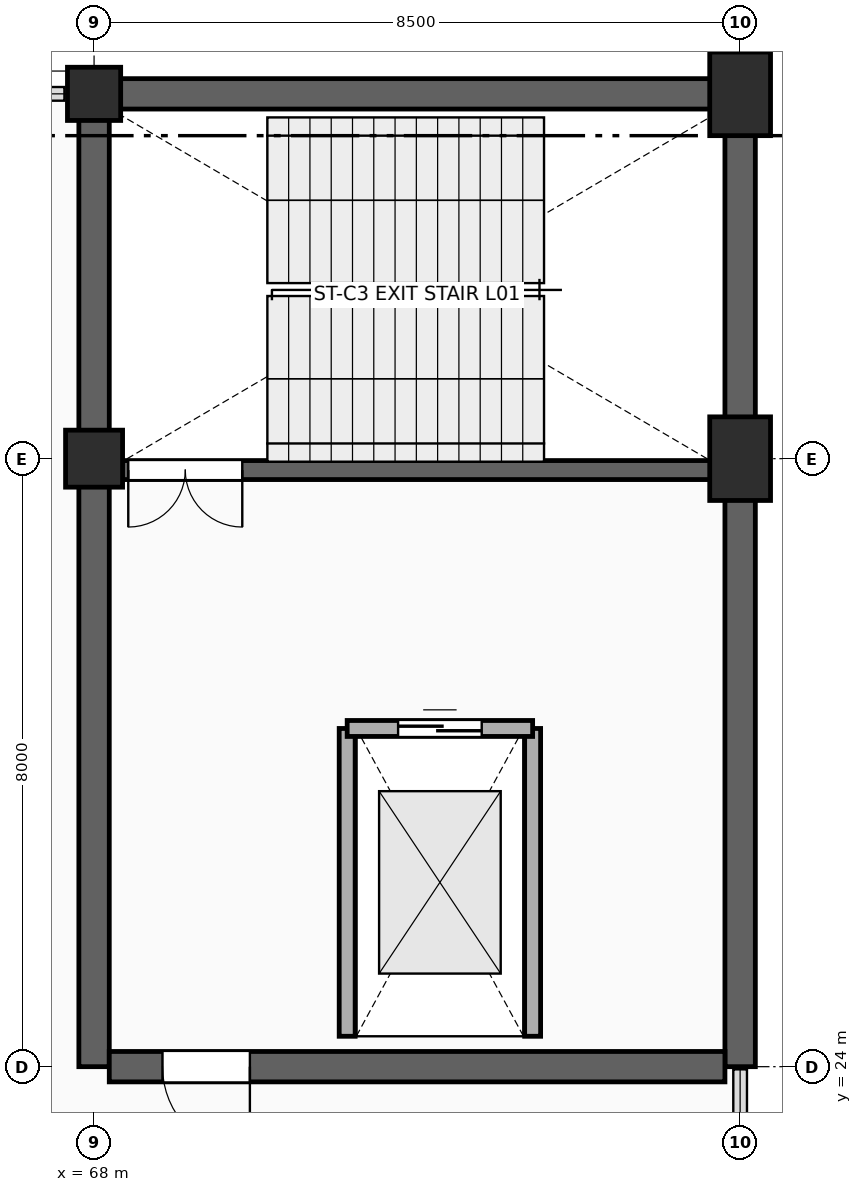
"""IFC4 building model, lengths in metres.
Left out: names, types, materials, properties, quantities, classifications, styles, units other than length and angle.
Written with IfcOpenShell. Run it as: python <this file> out.ifc"""

import sys

from ifc_helpers import new_model, si_unit, direction, frame, frame_2d, origin, origin_2d, place, context, subcontext, project, spatial, rectangle, extrude, element, fill, save


model = new_model("IFC4")
c1 = context("Model", 3, precision=1e-05, world=origin(), true_north=direction((0.0, 1.0)))
c2 = subcontext(c1, "Body", "Model", "MODEL_VIEW")
j1 = project(units=[si_unit("LENGTHUNIT", "METRE"), si_unit("PLANEANGLEUNIT", "RADIAN")], contexts=[c1])
p1 = place(None, origin())
s1 = spatial("IfcSite", under=j1, at=p1, CompositionType="ELEMENT")
p2 = place(p1, origin())
s2 = spatial("IfcBuilding", under=s1, at=p2, CompositionType="ELEMENT")
p3 = place(p2, frame((0.0, 0.0, 5.4)))
s3 = spatial("IfcBuildingStorey", under=s2, at=p3, CompositionType="ELEMENT", Elevation=5.4)
for number, where, z_axis, x_axis in (
    (1, (68.0, 24.0, 0.0), (0.0, 0.0, 1.0), (0.0, 1.0, 0.0)),
    (2, (76.5, 24.0, 0.0), (0.0, 0.0, 1.0), (0.0, 1.0, 0.0)),
):
    element("IfcWall", number, at=place(p3, frame(where, z_axis=z_axis, x_axis=x_axis)), inside=s3, PredefinedType="SHEAR", context=c2, shape_type="SweptSolid", body=[
        extrude(rectangle(XDim=12.8, YDim=0.4, at=frame_2d((6.4, 0.0))), origin(), (0.0, 0.0, 1.0), 4.64),
    ])
p4 = place(p3, frame((68.2, 36.8, 0.0), z_axis=(0.0, 0.0, 1.0), x_axis=(1.0, 0.0, 0.0)))
e3 = element("IfcWall", 3, at=p4, inside=s3, PredefinedType="SHEAR", context=c2, shape_type="SweptSolid", body=[
    extrude(rectangle(XDim=8.1, YDim=0.4, at=frame_2d((4.05, 0.0))), origin(), (0.0, 0.0, 1.0), 4.64),
])
p5 = place(p3, frame((68.2, 24.0, 0.0), z_axis=(0.0, 0.0, 1.0), x_axis=(1.0, 0.0, 0.0)))
e4 = element("IfcWall", 4, at=p5, inside=s3, PredefinedType="SHEAR", context=c2, shape_type="SweptSolid", body=[
    extrude(rectangle(XDim=8.1, YDim=0.4, at=frame_2d((4.05, 0.0))), origin(), (0.0, 0.0, 1.0), 4.64),
])
p6 = place(p5, frame((0.7, 0.0, 0.0)))
e5 = element("IfcOpeningElement", 5, at=p6, cuts=e4, PredefinedType="OPENING", context=c2, shape_type="SweptSolid", body=[
    extrude(rectangle(XDim=1.15, YDim=2.2, at=frame_2d((0.575, 1.1))), frame((0.0, 0.212, 0.0), z_axis=(0.0, -1.0, 0.0), x_axis=(1.0, 0.0, 0.0)), (0.0, 0.0, 1.0), 0.424),
])
p7 = place(p3, frame((68.25, 31.85, 0.0), z_axis=(0.0, 0.0, 1.0), x_axis=(1.0, 0.0, 0.0)))
e6 = element("IfcWall", 6, at=p7, inside=s3, PredefinedType="STANDARD", context=c2, shape_type="SweptSolid", body=[
    extrude(rectangle(XDim=8.0, YDim=0.25, at=frame_2d((4.0, 0.0))), origin(), (0.0, 0.0, 1.0), 4.64),
])
p8 = place(p7, frame((0.2, 0.0, 0.0)))
e7 = element("IfcOpeningElement", 7, at=p8, cuts=e6, PredefinedType="OPENING", context=c2, shape_type="SweptSolid", body=[
    extrude(rectangle(XDim=1.5, YDim=2.2, at=frame_2d((0.75, 1.1))), frame((0.0, 0.137, 0.0), z_axis=(0.0, -1.0, 0.0), x_axis=(1.0, 0.0, 0.0)), (0.0, 0.0, 1.0), 0.274),
])
for number, where, z_axis, x_axis in (
    (8, (71.33, 24.4, 0.0), (0.0, 0.0, 1.0), (0.0, 1.0, 0.0)),
    (9, (73.77, 24.4, 0.0), (0.0, 0.0, 1.0), (0.0, 1.0, 0.0)),
):
    element("IfcWall", number, at=place(p3, frame(where, z_axis=z_axis, x_axis=x_axis)), inside=s3, PredefinedType="PARTITIONING", context=c2, shape_type="SweptSolid", body=[
        extrude(rectangle(XDim=4.05, YDim=0.21, at=frame_2d((2.025, 0.0))), origin(), (0.0, 0.0, 1.0), 4.64),
    ])
p9 = place(p3, frame((71.33, 28.45, 0.0), z_axis=(0.0, 0.0, 1.0), x_axis=(1.0, 0.0, 0.0)))
e10 = element("IfcWall", 10, at=p9, inside=s3, PredefinedType="PARTITIONING", context=c2, shape_type="SweptSolid", body=[
    extrude(rectangle(XDim=2.44, YDim=0.21, at=frame_2d((1.22, 0.0))), origin(), (0.0, 0.0, 1.0), 4.64),
])
p10 = place(p9, frame((0.67, 0.0, 0.0)))
e11 = element("IfcOpeningElement", 11, at=p10, cuts=e10, PredefinedType="OPENING", context=c2, shape_type="SweptSolid", body=[
    extrude(rectangle(XDim=1.1, YDim=2.2, at=frame_2d((0.55, 1.1))), frame((0.0, 0.117, 0.0), z_axis=(0.0, -1.0, 0.0), x_axis=(1.0, 0.0, 0.0)), (0.0, 0.0, 1.0), 0.234),
])
p11 = place(p3, frame((68.0, 32.0, 0.0), z_axis=(0.0, 0.0, 1.0), x_axis=(1.0, 0.0, 0.0)))
e12 = element("IfcColumn", 12, at=p11, inside=s3, PredefinedType="COLUMN", context=c2, shape_type="SweptSolid", body=[
    extrude(rectangle(XDim=0.75, YDim=0.75, at=origin_2d()), origin(), (0.0, 0.0, 1.0), 4.52),
])
p12 = place(p3, frame((68.0, 36.8, 0.0), z_axis=(0.0, 0.0, 1.0), x_axis=(1.0, 0.0, 0.0)))
e13 = element("IfcColumn", 13, at=p12, inside=s3, PredefinedType="COLUMN", context=c2, shape_type="SweptSolid", body=[
    extrude(rectangle(XDim=0.7, YDim=0.7, at=origin_2d()), origin(), (0.0, 0.0, 1.0), 4.52),
])
for number, where, z_axis, x_axis in (
    (14, (76.5, 32.0, 0.0), (0.0, 0.0, 1.0), (1.0, 0.0, 0.0)),
    (15, (76.5, 36.8, 0.0), (0.0, 0.0, 1.0), (1.0, 0.0, 0.0)),
):
    element("IfcColumn", number, at=place(p3, frame(where, z_axis=z_axis, x_axis=x_axis)), inside=s3, PredefinedType="COLUMN", context=c2, shape_type="SweptSolid", body=[
        extrude(rectangle(XDim=0.8, YDim=1.1, at=origin_2d()), origin(), (0.0, 0.0, 1.0), 4.52),
    ])
p13 = place(p8, frame((1.5, 0.0, 0.0), z_axis=(0.0, 0.0, 1.0), x_axis=(-1.0, 0.0, 0.0)))
e16 = element("IfcDoor", 16, at=p13, inside=s3, OperationType="DOUBLE_DOOR_SINGLE_SWING", PredefinedType="DOOR", context=c2, shape_type="SweptSolid", body=[
    extrude(rectangle(XDim=1.5, YDim=2.2, at=frame_2d((0.75, 1.1))), frame((0.0, 0.025, 0.0), z_axis=(0.0, -1.0, 0.0), x_axis=(1.0, 0.0, 0.0)), (0.0, 0.0, 1.0), 0.05),
])
fill(e7, e16)
p14 = place(p10, origin())
e17 = element("IfcDoor", 17, at=p14, inside=s3, OperationType="DOUBLE_DOOR_SLIDING", PredefinedType="DOOR", context=c2, shape_type="SweptSolid", body=[
    extrude(rectangle(XDim=1.1, YDim=2.2, at=frame_2d((0.55, 1.1))), frame((0.0, 0.025, 0.0), z_axis=(0.0, -1.0, 0.0), x_axis=(1.0, 0.0, 0.0)), (0.0, 0.0, 1.0), 0.05),
])
fill(e11, e17)
p15 = place(p6, frame((1.15, 0.0, 0.0), z_axis=(0.0, 0.0, 1.0), x_axis=(-1.0, 0.0, 0.0)))
e18 = element("IfcDoor", 18, at=p15, inside=s3, OperationType="SINGLE_SWING_RIGHT", PredefinedType="DOOR", context=c2, shape_type="SweptSolid", body=[
    extrude(rectangle(XDim=1.15, YDim=2.2, at=frame_2d((0.575, 1.1))), frame((0.0, 0.025, 0.0), z_axis=(0.0, -1.0, 0.0), x_axis=(1.0, 0.0, 0.0)), (0.0, 0.0, 1.0), 0.05),
])
fill(e5, e18)
save(model, sys.argv[1])
